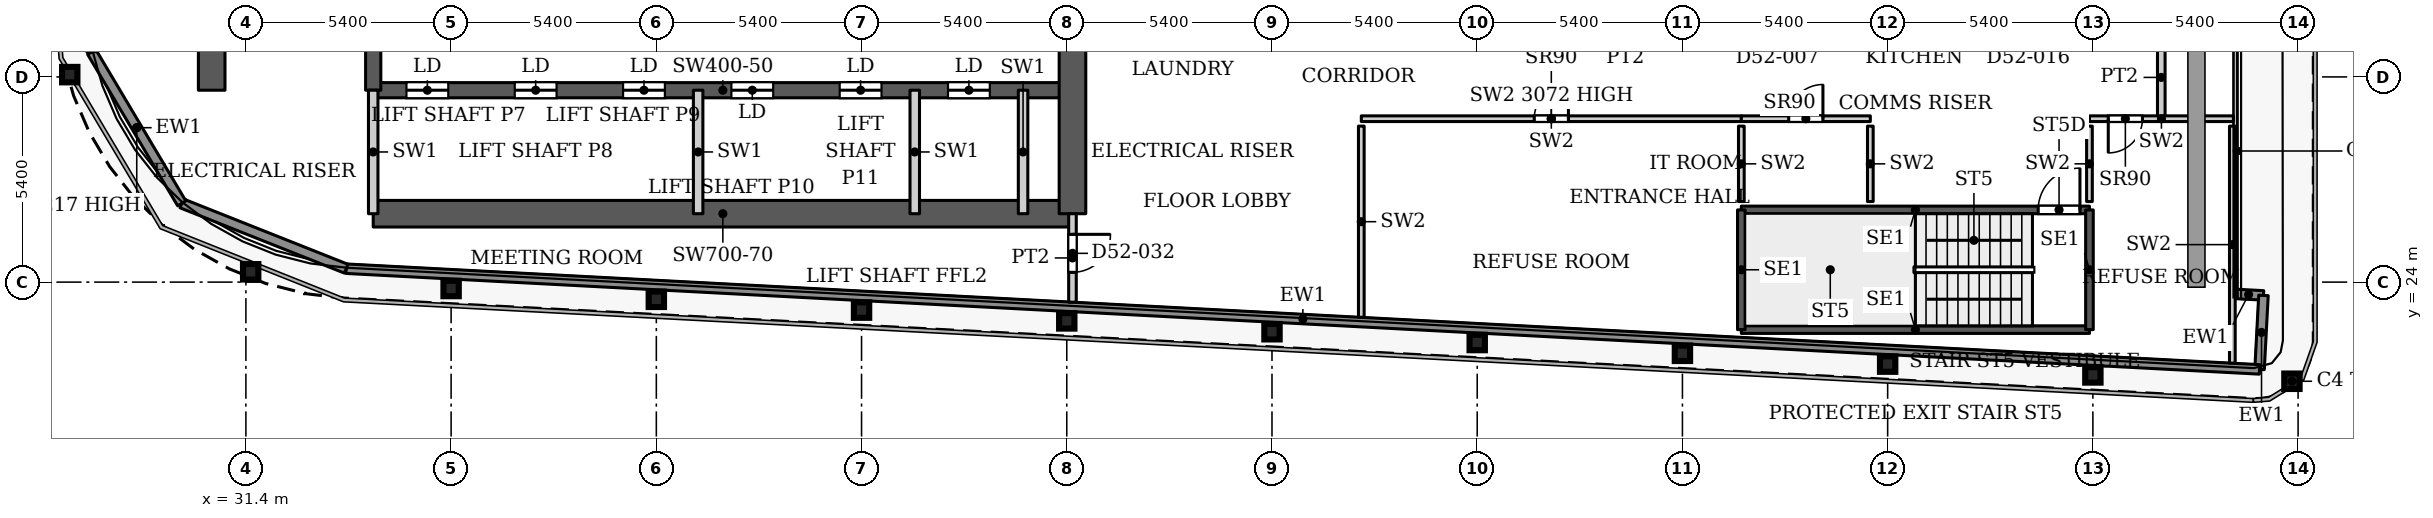
"""IFC4 building model, lengths in metres.
Left out: names, types, materials, properties, quantities, classifications, styles, units other than length and angle.
Written with IfcOpenShell. Run it as: python <this file> out.ifc"""

import sys

from ifc_helpers import new_model, si_unit, direction, frame, frame_2d, origin, origin_2d, place, context, subcontext, project, spatial, rectangle, i_section, extrude, source, transform, mapped, element, fill, save


model = new_model("IFC4")
c1 = context("Model", 3, precision=1e-05, world=origin(), true_north=direction((0.0, 1.0)))
c2 = subcontext(c1, "Body", "Model", "MODEL_VIEW")
j1 = project(units=[si_unit("LENGTHUNIT", "METRE"), si_unit("PLANEANGLEUNIT", "RADIAN")], contexts=[c1])
p1 = place(None, origin())
s1 = spatial("IfcSite", under=j1, at=p1, CompositionType="ELEMENT")
p2 = place(p1, origin())
s2 = spatial("IfcBuilding", under=s1, at=p2, CompositionType="ELEMENT")
p3 = place(p2, frame((0.0, 0.0, 224.0)))
s3 = spatial("IfcBuildingStorey", under=s2, at=p3, CompositionType="ELEMENT", Elevation=224.0)
for number, where, z_axis, x_axis in (
    (1, (85.238, 21.391, 0.0), (0.0, 0.0, 1.0), (1.0, 0.0, 0.0)),
    (2, (80.0, 21.558, 0.0), (0.0, 0.0, 1.0), (1.0, 0.0, 0.0)),
    (3, (74.6, 21.843, 0.0), (0.0, 0.0, 1.0), (1.0, 0.0, 0.0)),
    (4, (69.2, 22.127, 0.0), (0.0, 0.0, 1.0), (1.0, 0.0, 0.0)),
    (5, (63.8, 22.411, 0.0), (0.0, 0.0, 1.0), (1.0, 0.0, 0.0)),
    (6, (58.4, 22.695, 0.0), (0.0, 0.0, 1.0), (1.0, 0.0, 0.0)),
    (7, (53.0, 22.98, 0.0), (0.0, 0.0, 1.0), (1.0, 0.0, 0.0)),
    (8, (47.6, 23.264, 0.0), (0.0, 0.0, 1.0), (1.0, 0.0, 0.0)),
    (9, (42.2, 23.548, 0.0), (0.0, 0.0, 1.0), (1.0, 0.0, 0.0)),
    (10, (36.8, 23.832, 0.0), (0.0, 0.0, 1.0), (1.0, 0.0, 0.0)),
    (11, (31.526, 24.271, 0.0), (0.0, 0.0, 1.0), (1.0, 0.0, 0.0)),
    (12, (26.765, 29.46, 0.0), (0.0, 0.0, 1.0), (1.0, 0.0, 0.0)),
):
    element("IfcColumn", number, at=place(p3, frame(where, z_axis=z_axis, x_axis=x_axis)), inside=s3, PredefinedType="COLUMN", context=c2, shape_type="SweptSolid", body=[
        extrude(i_section(OverallWidth=0.404, OverallDepth=0.407, WebThickness=0.027, FlangeThickness=0.044, FilletRadius=0.012, at=origin_2d()), origin(), (0.0, 0.0, 1.0), 3.9),
    ])
p4 = place(p3, frame((34.75, 25.8, 0.0), z_axis=(0.0, 0.0, 1.0), x_axis=(1.0, 0.0, 0.0)))
e13 = element("IfcWall", 13, at=p4, inside=s3, PredefinedType="SHEAR", context=c2, shape_type="SweptSolid", body=[
    extrude(rectangle(XDim=18.4, YDim=0.7, at=frame_2d((9.2, 0.0))), origin(), (0.0, 0.0, 1.0), 3.9),
])
p5 = place(p3, frame((34.75, 29.05, 0.0), z_axis=(0.0, 0.0, 1.0), x_axis=(1.0, 0.0, 0.0)))
e14 = element("IfcWall", 14, at=p5, inside=s3, PredefinedType="SHEAR", context=c2, shape_type="SweptSolid", body=[
    extrude(rectangle(XDim=18.4, YDim=0.4, at=frame_2d((9.2, 0.0))), origin(), (0.0, 0.0, 1.0), 3.9),
])
p6 = place(p5, frame((0.875, 0.0, 0.0)))
e15 = element("IfcOpeningElement", 15, at=p6, cuts=e14, PredefinedType="OPENING", context=c2, shape_type="SweptSolid", body=[
    extrude(rectangle(XDim=1.1, YDim=2.2, at=frame_2d((0.55, 1.1))), frame((0.0, 0.21, 0.0), z_axis=(0.0, -1.0, 0.0), x_axis=(1.0, 0.0, 0.0)), (0.0, 0.0, 1.0), 0.42),
])
p7 = place(p5, frame((3.725, 0.0, 0.0)))
e16 = element("IfcOpeningElement", 16, at=p7, cuts=e14, PredefinedType="OPENING", context=c2, shape_type="SweptSolid", body=[
    extrude(rectangle(XDim=1.1, YDim=2.2, at=frame_2d((0.55, 1.1))), frame((0.0, 0.21, 0.0), z_axis=(0.0, -1.0, 0.0), x_axis=(1.0, 0.0, 0.0)), (0.0, 0.0, 1.0), 0.42),
])
p8 = place(p5, frame((6.575, 0.0, 0.0)))
e17 = element("IfcOpeningElement", 17, at=p8, cuts=e14, PredefinedType="OPENING", context=c2, shape_type="SweptSolid", body=[
    extrude(rectangle(XDim=1.1, YDim=2.2, at=frame_2d((0.55, 1.1))), frame((0.0, 0.21, 0.0), z_axis=(0.0, -1.0, 0.0), x_axis=(1.0, 0.0, 0.0)), (0.0, 0.0, 1.0), 0.42),
])
p9 = place(p5, frame((9.425, 0.0, 0.0)))
e18 = element("IfcOpeningElement", 18, at=p9, cuts=e14, PredefinedType="OPENING", context=c2, shape_type="SweptSolid", body=[
    extrude(rectangle(XDim=1.1, YDim=2.2, at=frame_2d((0.55, 1.1))), frame((0.0, 0.21, 0.0), z_axis=(0.0, -1.0, 0.0), x_axis=(1.0, 0.0, 0.0)), (0.0, 0.0, 1.0), 0.42),
])
p10 = place(p5, frame((12.275, 0.0, 0.0)))
e19 = element("IfcOpeningElement", 19, at=p10, cuts=e14, PredefinedType="OPENING", context=c2, shape_type="SweptSolid", body=[
    extrude(rectangle(XDim=1.1, YDim=2.2, at=frame_2d((0.55, 1.1))), frame((0.0, 0.21, 0.0), z_axis=(0.0, -1.0, 0.0), x_axis=(1.0, 0.0, 0.0)), (0.0, 0.0, 1.0), 0.42),
])
p11 = place(p5, frame((15.125, 0.0, 0.0)))
e20 = element("IfcOpeningElement", 20, at=p11, cuts=e14, PredefinedType="OPENING", context=c2, shape_type="SweptSolid", body=[
    extrude(rectangle(XDim=1.1, YDim=2.2, at=frame_2d((0.55, 1.1))), frame((0.0, 0.21, 0.0), z_axis=(0.0, -1.0, 0.0), x_axis=(1.0, 0.0, 0.0)), (0.0, 0.0, 1.0), 0.42),
])
p12 = place(p3, frame((34.75, 29.05, 0.0), z_axis=(0.0, 0.0, 1.0), x_axis=(0.0, 1.0, 0.0)))
e21 = element("IfcWall", 21, at=p12, inside=s3, PredefinedType="SHEAR", context=c2, shape_type="SweptSolid", body=[
    extrude(rectangle(XDim=18.45, YDim=0.4, at=frame_2d((9.225, 0.0))), origin(), (0.0, 0.0, 1.0), 3.9),
])
p13 = place(p12, frame((8.025, 0.0, 0.0)))
e22 = element("IfcOpeningElement", 22, at=p13, cuts=e21, PredefinedType="OPENING", context=c2, shape_type="SweptSolid", body=[
    extrude(rectangle(XDim=1.1, YDim=2.2, at=frame_2d((0.55, 1.1))), frame((0.0, 0.21, 0.0), z_axis=(0.0, -1.0, 0.0), x_axis=(1.0, 0.0, 0.0)), (0.0, 0.0, 1.0), 0.42),
])
p14 = place(p12, frame((10.875, 0.0, 0.0)))
e23 = element("IfcOpeningElement", 23, at=p14, cuts=e21, PredefinedType="OPENING", context=c2, shape_type="SweptSolid", body=[
    extrude(rectangle(XDim=1.1, YDim=2.2, at=frame_2d((0.55, 1.1))), frame((0.0, 0.21, 0.0), z_axis=(0.0, -1.0, 0.0), x_axis=(1.0, 0.0, 0.0)), (0.0, 0.0, 1.0), 0.42),
])
p15 = place(p12, frame((13.725, 0.0, 0.0)))
e24 = element("IfcOpeningElement", 24, at=p15, cuts=e21, PredefinedType="OPENING", context=c2, shape_type="SweptSolid", body=[
    extrude(rectangle(XDim=1.1, YDim=2.2, at=frame_2d((0.55, 1.1))), frame((0.0, 0.21, 0.0), z_axis=(0.0, -1.0, 0.0), x_axis=(1.0, 0.0, 0.0)), (0.0, 0.0, 1.0), 0.42),
])
p16 = place(p12, frame((15.95, 0.0, 0.0)))
e25 = element("IfcOpeningElement", 25, at=p16, cuts=e21, PredefinedType="OPENING", context=c2, shape_type="SweptSolid", body=[
    extrude(rectangle(XDim=1.1, YDim=2.2, at=frame_2d((0.55, 1.1))), frame((0.0, 0.21, 0.0), z_axis=(0.0, -1.0, 0.0), x_axis=(1.0, 0.0, 0.0)), (0.0, 0.0, 1.0), 0.42),
])
p17 = place(p3, frame((30.5, 29.05, 0.0), z_axis=(0.0, 0.0, 1.0), x_axis=(0.0, 1.0, 0.0)))
e26 = element("IfcWall", 26, at=p17, inside=s3, PredefinedType="SHEAR", context=c2, shape_type="SweptSolid", body=[
    extrude(rectangle(XDim=18.45, YDim=0.7, at=frame_2d((9.225, 0.0))), origin(), (0.0, 0.0, 1.0), 3.9),
])
p18 = place(p17, frame((6.21, 0.0, 0.0)))
e27 = element("IfcOpeningElement", 27, at=p18, cuts=e26, PredefinedType="OPENING", context=c2, shape_type="SweptSolid", body=[
    extrude(rectangle(XDim=0.9, YDim=2.2, at=frame_2d((0.45, 1.1))), frame((0.0, 0.36, 0.0), z_axis=(0.0, -1.0, 0.0), x_axis=(1.0, 0.0, 0.0)), (0.0, 0.0, 1.0), 0.72),
])
p19 = place(p17, frame((10.684, 0.0, 0.0)))
e28 = element("IfcOpeningElement", 28, at=p19, cuts=e26, PredefinedType="OPENING", context=c2, shape_type="SweptSolid", body=[
    extrude(rectangle(XDim=0.9, YDim=2.2, at=frame_2d((0.45, 1.1))), frame((0.0, 0.36, 0.0), z_axis=(0.0, -1.0, 0.0), x_axis=(1.0, 0.0, 0.0)), (0.0, 0.0, 1.0), 0.72),
])
p20 = place(p3, frame((53.15, 25.8, 0.0), z_axis=(0.0, 0.0, 1.0), x_axis=(0.0, 1.0, 0.0)))
e29 = element("IfcWall", 29, at=p20, inside=s3, PredefinedType="SHEAR", context=c2, shape_type="SweptSolid", body=[
    extrude(rectangle(XDim=10.4, YDim=0.7, at=frame_2d((5.2, 0.0))), origin(), (0.0, 0.0, 1.0), 3.9),
])
p21 = place(p3, frame((83.707, 23.692, 0.0), z_axis=(0.0, 0.0, 1.0), x_axis=(0.998561284263, -0.053622398031, 0.0)))
e30 = element("IfcWall", 30, at=p21, inside=s3, PredefinedType="SOLIDWALL", context=c2, shape_type="SweptSolid", body=[
    extrude(rectangle(XDim=0.783, YDim=0.25, at=frame_2d((0.392, 0.0))), origin(), (0.0, 0.0, 1.0), 3.75),
])
p22 = place(p3, frame((84.489, 23.65, 0.0), z_axis=(0.0, 0.0, 1.0), x_axis=(-0.052841433274, -0.998602915542, 0.0)))
e31 = element("IfcWall", 31, at=p22, inside=s3, PredefinedType="SOLIDWALL", context=c2, shape_type="SweptSolid", body=[
    extrude(rectangle(XDim=1.95, YDim=0.25, at=frame_2d((0.975, 0.0))), origin(), (0.0, 0.0, 1.0), 3.75),
])
p23 = place(p3, frame((84.386, 21.703, 0.0), z_axis=(0.0, 0.0, 1.0), x_axis=(-0.998617508267, 0.05256493302, 0.0)))
e32 = element("IfcWall", 32, at=p23, inside=s3, PredefinedType="SOLIDWALL", context=c2, shape_type="SweptSolid", body=[
    extrude(rectangle(XDim=50.417, YDim=0.25, at=frame_2d((25.208, 0.0))), origin(), (0.0, 0.0, 1.0), 3.75),
])
p24 = place(p3, frame((34.039, 24.353, 0.0), z_axis=(0.0, 0.0, 1.0), x_axis=(-0.929352825399, 0.369192803184, 0.0)))
e33 = element("IfcWall", 33, at=p24, inside=s3, PredefinedType="SOLIDWALL", context=c2, shape_type="SweptSolid", body=[
    extrude(rectangle(XDim=4.656, YDim=0.25, at=frame_2d((2.328, 0.0))), origin(), (0.0, 0.0, 1.0), 3.75),
])
p25 = place(p3, frame((29.712, 26.072, 0.0), z_axis=(0.0, 0.0, 1.0), x_axis=(-0.511028049012, 0.859564036662, 0.0)))
e34 = element("IfcWall", 34, at=p25, inside=s3, PredefinedType="SOLIDWALL", context=c2, shape_type="SweptSolid", body=[
    extrude(rectangle(XDim=4.634, YDim=0.25, at=frame_2d((2.317, 0.0))), origin(), (0.0, 0.0, 1.0), 3.217),
])
p26 = place(p3, frame((27.344, 30.055, 0.0), z_axis=(0.0, 0.0, 1.0), x_axis=(-0.077571675317, 0.99698677784, 0.0)))
e35 = element("IfcWall", 35, at=p26, inside=s3, PredefinedType="SOLIDWALL", context=c2, shape_type="SweptSolid", body=[
    extrude(rectangle(XDim=1.92, YDim=0.25, at=frame_2d((0.96, 0.0))), origin(), (0.0, 0.0, 1.0), 3.75),
])
p27 = place(p3, frame((70.75, 22.75, 0.0), z_axis=(0.0, 0.0, 1.0), x_axis=(1.0, 0.0, 0.0)))
e36 = element("IfcWall", 36, at=p27, inside=s3, PredefinedType="SHEAR", context=c2, shape_type="SweptSolid", body=[
    extrude(rectangle(XDim=9.16, YDim=0.2, at=frame_2d((4.58, 0.0))), origin(), (0.0, 0.0, 1.0), 3.9),
])
p28 = place(p3, frame((70.75, 25.9, 0.0), z_axis=(0.0, 0.0, 1.0), x_axis=(1.0, 0.0, 0.0)))
e37 = element("IfcWall", 37, at=p28, inside=s3, PredefinedType="SHEAR", context=c2, shape_type="SweptSolid", body=[
    extrude(rectangle(XDim=9.16, YDim=0.2, at=frame_2d((4.58, 0.0))), origin(), (0.0, 0.0, 1.0), 3.9),
])
p29 = place(p28, frame((7.81, 0.0, 0.0)))
e38 = element("IfcOpeningElement", 38, at=p29, cuts=e37, PredefinedType="OPENING", context=c2, shape_type="SweptSolid", body=[
    extrude(rectangle(XDim=1.1, YDim=2.2, at=frame_2d((0.55, 1.1))), frame((0.0, 0.11, 0.0), z_axis=(0.0, -1.0, 0.0), x_axis=(1.0, 0.0, 0.0)), (0.0, 0.0, 1.0), 0.22),
])
for number, where, z_axis, x_axis in (
    (39, (70.75, 22.75, 0.0), (0.0, 0.0, 1.0), (0.0, 1.0, 0.0)),
    (40, (79.91, 22.75, 0.0), (0.0, 0.0, 1.0), (0.0, 1.0, 0.0)),
):
    element("IfcWall", number, at=place(p3, frame(where, z_axis=z_axis, x_axis=x_axis)), inside=s3, PredefinedType="SHEAR", context=c2, shape_type="SweptSolid", body=[
        extrude(rectangle(XDim=3.15, YDim=0.2, at=frame_2d((1.575, 0.0))), origin(), (0.0, 0.0, 1.0), 3.9),
    ])
for number, where, z_axis, x_axis in (
    (41, (34.75, 25.8, 0.0), (0.0, 0.0, 1.0), (0.0, 1.0, 0.0)),
    (42, (43.3, 25.8, 0.0), (0.0, 0.0, 1.0), (0.0, 1.0, 0.0)),
    (43, (49.0, 25.8, 0.0), (0.0, 0.0, 1.0), (0.0, 1.0, 0.0)),
    (44, (51.85, 25.8, 0.0), (0.0, 0.0, 1.0), (0.0, 1.0, 0.0)),
):
    element("IfcWall", number, at=place(p3, frame(where, z_axis=z_axis, x_axis=x_axis)), inside=s3, PredefinedType="PARTITIONING", context=c2, shape_type="SweptSolid", body=[
        extrude(rectangle(XDim=3.25, YDim=0.25, at=frame_2d((1.625, 0.0))), origin(), (0.0, 0.0, 1.0), 3.9),
    ])
p30 = place(p3, frame((60.75, 28.3, 0.0), z_axis=(0.0, 0.0, 1.0), x_axis=(1.0, 0.0, 0.0)))
e45 = element("IfcWall", 45, at=p30, inside=s3, PredefinedType="PARTITIONING", context=c2, shape_type="SweptSolid", body=[
    extrude(rectangle(XDim=10.0, YDim=0.15, at=frame_2d((5.0, 0.0))), origin(), (0.0, 0.0, 1.0), 3.072),
])
p31 = place(p30, frame((4.55, 0.0, 0.0)))
e46 = element("IfcOpeningElement", 46, at=p31, cuts=e45, PredefinedType="OPENING", context=c2, shape_type="SweptSolid", body=[
    extrude(rectangle(XDim=0.9, YDim=2.2, at=frame_2d((0.45, 1.1))), frame((0.0, 0.085, 0.0), z_axis=(0.0, -1.0, 0.0), x_axis=(1.0, 0.0, 0.0)), (0.0, 0.0, 1.0), 0.17),
])
p32 = place(p3, frame((60.75, 23.075, 0.0), z_axis=(0.0, 0.0, 1.0), x_axis=(0.0, 1.0, 0.0)))
e47 = element("IfcWall", 47, at=p32, inside=s3, PredefinedType="PARTITIONING", context=c2, shape_type="SweptSolid", body=[
    extrude(rectangle(XDim=5.03, YDim=0.15, at=frame_2d((2.515, 0.0))), origin(), (0.0, 0.0, 1.0), 3.9),
])
p33 = place(p3, frame((70.75, 26.12, 0.0), z_axis=(0.0, 0.0, 1.0), x_axis=(0.0, 1.0, 0.0)))
e48 = element("IfcWall", 48, at=p33, inside=s3, PredefinedType="PARTITIONING", context=c2, shape_type="SweptSolid", body=[
    extrude(rectangle(XDim=1.985, YDim=0.15, at=frame_2d((0.992, 0.0))), origin(), (0.0, 0.0, 1.0), 3.9),
])
p34 = place(p3, frame((70.75, 28.3, 0.0), z_axis=(0.0, 0.0, 1.0), x_axis=(1.0, 0.0, 0.0)))
e49 = element("IfcWall", 49, at=p34, inside=s3, PredefinedType="PARTITIONING", context=c2, shape_type="SweptSolid", body=[
    extrude(rectangle(XDim=3.394, YDim=0.15, at=frame_2d((1.697, 0.0))), origin(), (0.0, 0.0, 1.0), 3.9),
])
p35 = place(p34, frame((1.247, 0.0, 0.0)))
e50 = element("IfcOpeningElement", 50, at=p35, cuts=e49, PredefinedType="OPENING", context=c2, shape_type="SweptSolid", body=[
    extrude(rectangle(XDim=0.9, YDim=2.2, at=frame_2d((0.45, 1.1))), frame((0.0, 0.085, 0.0), z_axis=(0.0, -1.0, 0.0), x_axis=(1.0, 0.0, 0.0)), (0.0, 0.0, 1.0), 0.17),
])
p36 = place(p3, frame((74.144, 26.12, 0.0), z_axis=(0.0, 0.0, 1.0), x_axis=(0.0, 1.0, 0.0)))
e51 = element("IfcWall", 51, at=p36, inside=s3, PredefinedType="PARTITIONING", context=c2, shape_type="SweptSolid", body=[
    extrude(rectangle(XDim=1.985, YDim=0.15, at=frame_2d((0.992, 0.0))), origin(), (0.0, 0.0, 1.0), 3.9),
])
p37 = place(p3, frame((79.91, 28.3, 0.0), z_axis=(0.0, 0.0, 1.0), x_axis=(1.0, 0.0, 0.0)))
e52 = element("IfcWall", 52, at=p37, inside=s3, PredefinedType="PARTITIONING", context=c2, shape_type="SweptSolid", body=[
    extrude(rectangle(XDim=3.788, YDim=0.15, at=frame_2d((1.894, 0.0))), origin(), (0.0, 0.0, 1.0), 3.9),
])
p38 = place(p37, frame((0.495, 0.0, 0.0)))
e53 = element("IfcOpeningElement", 53, at=p38, cuts=e52, PredefinedType="OPENING", context=c2, shape_type="SweptSolid", body=[
    extrude(rectangle(XDim=0.9, YDim=2.2, at=frame_2d((0.45, 1.1))), frame((0.0, 0.085, 0.0), z_axis=(0.0, -1.0, 0.0), x_axis=(1.0, 0.0, 0.0)), (0.0, 0.0, 1.0), 0.17),
])
p39 = place(p3, frame((79.91, 26.12, 0.0), z_axis=(0.0, 0.0, 1.0), x_axis=(0.0, 1.0, 0.0)))
e54 = element("IfcWall", 54, at=p39, inside=s3, PredefinedType="PARTITIONING", context=c2, shape_type="SweptSolid", body=[
    extrude(rectangle(XDim=1.985, YDim=0.15, at=frame_2d((0.992, 0.0))), origin(), (0.0, 0.0, 1.0), 3.9),
])
p40 = place(p3, frame((83.67, 21.868, 0.0), z_axis=(0.0, 0.0, 1.0), x_axis=(0.0, 1.0, 0.0)))
e55 = element("IfcWall", 55, at=p40, inside=s3, PredefinedType="PARTITIONING", context=c2, shape_type="SweptSolid", body=[
    extrude(rectangle(XDim=6.237, YDim=0.15, at=frame_2d((3.119, 0.0))), origin(), (0.0, 0.0, 1.0), 3.9),
])
p41 = place(p3, frame((53.15, 23.472, 0.0), z_axis=(0.0, 0.0, 1.0), x_axis=(0.0, 1.0, 0.0)))
e56 = element("IfcWall", 56, at=p41, inside=s3, PredefinedType="PARTITIONING", context=c2, shape_type="SweptSolid", body=[
    extrude(rectangle(XDim=2.328, YDim=0.2, at=frame_2d((1.164, 0.0))), origin(), (0.0, 0.0, 1.0), 3.6),
])
p42 = place(p41, frame((0.785, 0.0, 0.0)))
e57 = element("IfcOpeningElement", 57, at=p42, cuts=e56, PredefinedType="OPENING", context=c2, shape_type="SweptSolid", body=[
    extrude(rectangle(XDim=1.0, YDim=2.1, at=frame_2d((0.5, 1.05))), frame((0.0, 0.11, 0.0), z_axis=(0.0, -1.0, 0.0), x_axis=(1.0, 0.0, 0.0)), (0.0, 0.0, 1.0), 0.22),
])
p43 = place(p3, frame((81.8, 28.374, 0.0), z_axis=(0.0, 0.0, 1.0), x_axis=(0.0, 1.0, 0.0)))
e58 = element("IfcWall", 58, at=p43, inside=s3, PredefinedType="PARTITIONING", context=c2, shape_type="SweptSolid", body=[
    extrude(rectangle(XDim=2.026, YDim=0.2, at=frame_2d((1.013, 0.0))), origin(), (0.0, 0.0, 1.0), 3.6),
])
m1 = source(origin(), c2, "Body", "SweptSolid", [
    extrude(rectangle(XDim=1.1, YDim=2.2, at=frame_2d((0.55, 1.1))), frame((0.0, 0.025, 0.0), z_axis=(0.0, -1.0, 0.0), x_axis=(1.0, 0.0, 0.0)), (0.0, 0.0, 1.0), 0.05),
])
p44 = place(p6, origin())
e59 = element("IfcDoor", 59, at=p44, inside=s3, OperationType="SLIDING_TO_LEFT", PredefinedType="DOOR", context=c2, shape_type="MappedRepresentation", body=[
    mapped(m1, transform((0.0, 0.0, 0.0), x_axis=(1.0, 0.0, 0.0), y_axis=(0.0, 1.0, 0.0), z_axis=(0.0, 0.0, 1.0), scale=1.0)),
])
fill(e15, e59)
p45 = place(p7, origin())
e60 = element("IfcDoor", 60, at=p45, inside=s3, OperationType="SLIDING_TO_LEFT", PredefinedType="DOOR", context=c2, shape_type="MappedRepresentation", body=[
    mapped(m1, transform((0.0, 0.0, 0.0), x_axis=(1.0, 0.0, 0.0), y_axis=(0.0, 1.0, 0.0), z_axis=(0.0, 0.0, 1.0), scale=1.0)),
])
fill(e16, e60)
p46 = place(p8, origin())
e61 = element("IfcDoor", 61, at=p46, inside=s3, OperationType="SLIDING_TO_LEFT", PredefinedType="DOOR", context=c2, shape_type="MappedRepresentation", body=[
    mapped(m1, transform((0.0, 0.0, 0.0), x_axis=(1.0, 0.0, 0.0), y_axis=(0.0, 1.0, 0.0), z_axis=(0.0, 0.0, 1.0), scale=1.0)),
])
fill(e17, e61)
p47 = place(p9, origin())
e62 = element("IfcDoor", 62, at=p47, inside=s3, OperationType="SLIDING_TO_LEFT", PredefinedType="DOOR", context=c2, shape_type="MappedRepresentation", body=[
    mapped(m1, transform((0.0, 0.0, 0.0), x_axis=(1.0, 0.0, 0.0), y_axis=(0.0, 1.0, 0.0), z_axis=(0.0, 0.0, 1.0), scale=1.0)),
])
fill(e18, e62)
p48 = place(p10, origin())
e63 = element("IfcDoor", 63, at=p48, inside=s3, OperationType="SLIDING_TO_LEFT", PredefinedType="DOOR", context=c2, shape_type="MappedRepresentation", body=[
    mapped(m1, transform((0.0, 0.0, 0.0), x_axis=(1.0, 0.0, 0.0), y_axis=(0.0, 1.0, 0.0), z_axis=(0.0, 0.0, 1.0), scale=1.0)),
])
fill(e19, e63)
p49 = place(p11, origin())
e64 = element("IfcDoor", 64, at=p49, inside=s3, OperationType="SLIDING_TO_LEFT", PredefinedType="DOOR", context=c2, shape_type="MappedRepresentation", body=[
    mapped(m1, transform((0.0, 0.0, 0.0), x_axis=(1.0, 0.0, 0.0), y_axis=(0.0, 1.0, 0.0), z_axis=(0.0, 0.0, 1.0), scale=1.0)),
])
fill(e20, e64)
m2 = source(origin(), c2, "Body", "SweptSolid", [
    extrude(rectangle(XDim=0.9, YDim=2.2, at=frame_2d((0.45, 1.1))), frame((0.0, 0.025, 0.0), z_axis=(0.0, -1.0, 0.0), x_axis=(1.0, 0.0, 0.0)), (0.0, 0.0, 1.0), 0.05),
])
p50 = place(p31, origin())
e65 = element("IfcDoor", 65, at=p50, inside=s3, OperationType="SINGLE_SWING_LEFT", PredefinedType="DOOR", context=c2, shape_type="MappedRepresentation", body=[
    mapped(m2, transform((0.0, 0.0, 0.0), x_axis=(1.0, 0.0, 0.0), y_axis=(0.0, 1.0, 0.0), z_axis=(0.0, 0.0, 1.0), scale=1.0)),
])
fill(e46, e65)
p51 = place(p35, origin())
e66 = element("IfcDoor", 66, at=p51, inside=s3, OperationType="SINGLE_SWING_LEFT", PredefinedType="DOOR", context=c2, shape_type="MappedRepresentation", body=[
    mapped(m2, transform((0.0, 0.0, 0.0), x_axis=(1.0, 0.0, 0.0), y_axis=(0.0, 1.0, 0.0), z_axis=(0.0, 0.0, 1.0), scale=1.0)),
])
fill(e50, e66)
p52 = place(p38, origin())
e67 = element("IfcDoor", 67, at=p52, inside=s3, OperationType="SINGLE_SWING_RIGHT", PredefinedType="DOOR", context=c2, shape_type="MappedRepresentation", body=[
    mapped(m2, transform((0.0, 0.0, 0.0), x_axis=(1.0, 0.0, 0.0), y_axis=(0.0, 1.0, 0.0), z_axis=(0.0, 0.0, 1.0), scale=1.0)),
])
fill(e53, e67)
m3 = source(origin(), c2, "Body", "SweptSolid", [
    extrude(rectangle(XDim=1.1, YDim=2.2, at=frame_2d((0.55, 1.1))), frame((0.0, 0.025, 0.0), z_axis=(0.0, -1.0, 0.0), x_axis=(1.0, 0.0, 0.0)), (0.0, 0.0, 1.0), 0.05),
])
p53 = place(p29, origin())
e68 = element("IfcDoor", 68, at=p53, inside=s3, OperationType="SINGLE_SWING_LEFT", PredefinedType="DOOR", context=c2, shape_type="MappedRepresentation", body=[
    mapped(m3, transform((0.0, 0.0, 0.0), x_axis=(1.0, 0.0, 0.0), y_axis=(0.0, 1.0, 0.0), z_axis=(0.0, 0.0, 1.0), scale=1.0)),
])
fill(e38, e68)
m4 = source(origin(), c2, "Body", "SweptSolid", [
    extrude(rectangle(XDim=1.0, YDim=2.1, at=frame_2d((0.5, 1.05))), frame((0.0, 0.025, 0.0), z_axis=(0.0, -1.0, 0.0), x_axis=(1.0, 0.0, 0.0)), (0.0, 0.0, 1.0), 0.05),
])
p54 = place(p42, origin())
e69 = element("IfcDoor", 69, at=p54, inside=s3, OperationType="SINGLE_SWING_RIGHT", PredefinedType="DOOR", context=c2, shape_type="MappedRepresentation", body=[
    mapped(m4, transform((0.0, 0.0, 0.0), x_axis=(1.0, 0.0, 0.0), y_axis=(0.0, 1.0, 0.0), z_axis=(0.0, 0.0, 1.0), scale=1.0)),
])
fill(e57, e69)
save(model, sys.argv[1])
